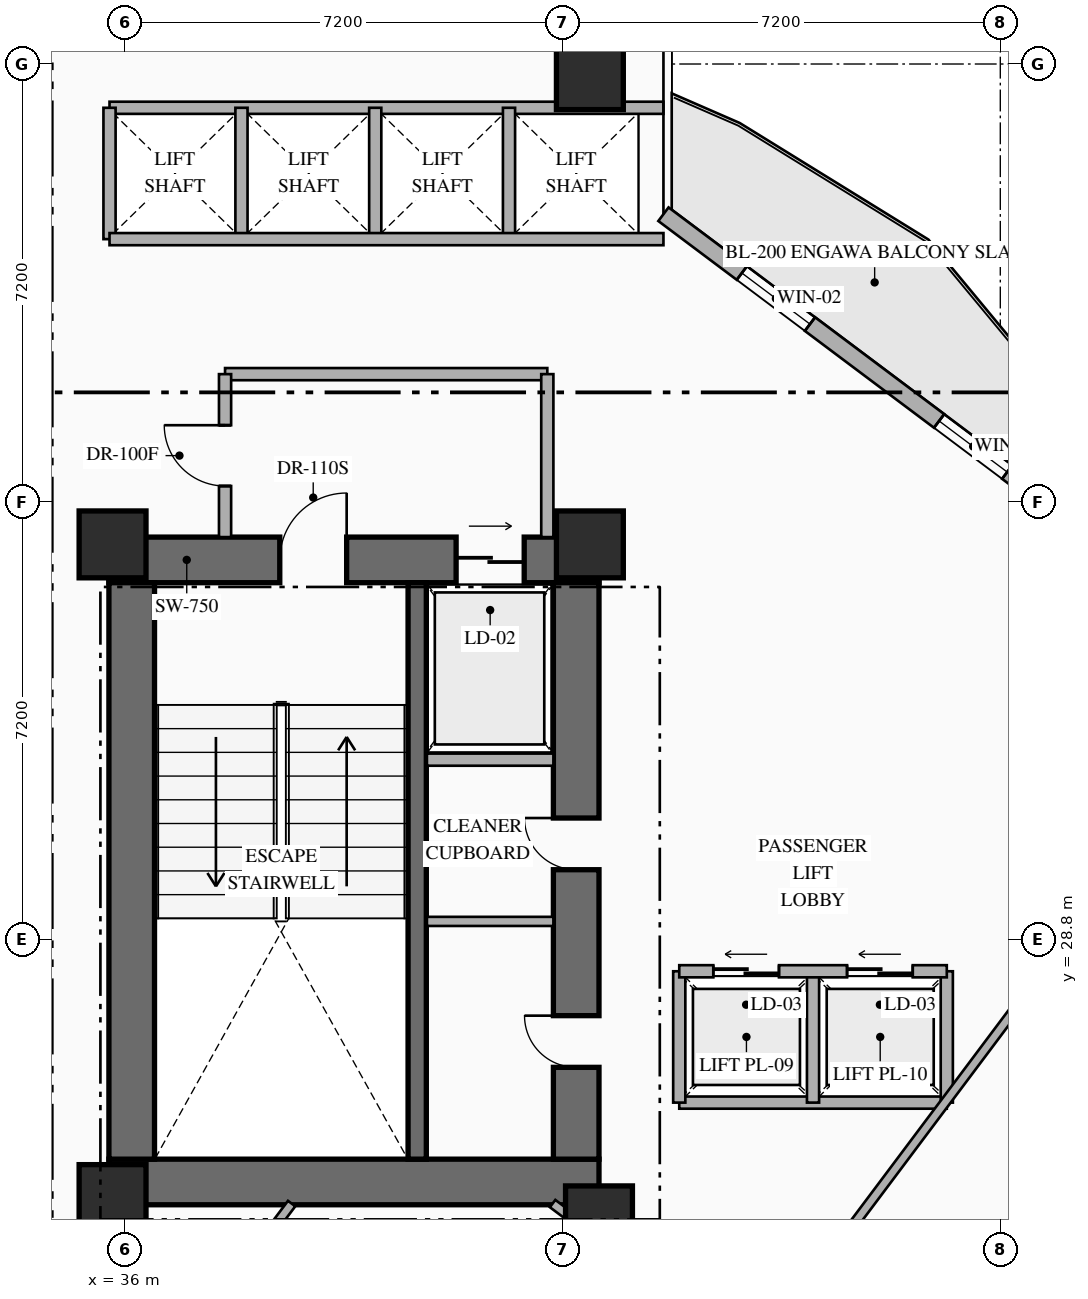
"""IFC4 building model, lengths in metres.
Left out: names, types, materials, properties, quantities, classifications, styles, units other than length and angle.
Written with IfcOpenShell. Run it as: python <this file> out.ifc"""

import sys

from ifc_helpers import new_model, si_unit, direction, frame, frame_2d, origin, origin_2d, place, context, subcontext, project, spatial, rectangle, extrude, element, fill, save


model = new_model("IFC4")
c1 = context("Model", 3, precision=1e-05, world=origin(), true_north=direction((0.0, 1.0)))
c2 = subcontext(c1, "Body", "Model", "MODEL_VIEW")
j1 = project(units=[si_unit("LENGTHUNIT", "METRE"), si_unit("PLANEANGLEUNIT", "RADIAN")], contexts=[c1])
p1 = place(None, origin())
s1 = spatial("IfcSite", under=j1, at=p1, CompositionType="ELEMENT")
p2 = place(p1, origin())
s2 = spatial("IfcBuilding", under=s1, at=p2, CompositionType="ELEMENT")
p3 = place(p2, frame((0.0, 0.0, 53.35)))
s3 = spatial("IfcBuildingStorey", under=s2, at=p3, CompositionType="ELEMENT", Elevation=53.35)
p4 = place(p3, frame((35.74, 24.815, 0.0), z_axis=(0.0, 0.0, 1.0), x_axis=(1.0, 0.0, 0.0)))
e1 = element("IfcWall", 1, at=p4, inside=s3, PredefinedType="SHEAR", context=c2, shape_type="SweptSolid", body=[
    extrude(rectangle(XDim=8.06, YDim=0.75, at=frame_2d((4.03, 0.0))), origin(), (0.0, 0.0, 1.0), 3.35),
])
p5 = place(p3, frame((35.74, 35.045, 0.0), z_axis=(0.0, 0.0, 1.0), x_axis=(1.0, 0.0, 0.0)))
e2 = element("IfcWall", 2, at=p5, inside=s3, PredefinedType="SHEAR", context=c2, shape_type="SweptSolid", body=[
    extrude(rectangle(XDim=8.06, YDim=0.75, at=frame_2d((4.03, 0.0))), origin(), (0.0, 0.0, 1.0), 3.35),
])
p6 = place(p5, frame((2.81, 0.0, 0.0)))
e3 = element("IfcOpeningElement", 3, at=p6, cuts=e2, PredefinedType="OPENING", context=c2, shape_type="SweptSolid", body=[
    extrude(rectangle(XDim=1.1, YDim=2.2, at=frame_2d((0.55, 1.1))), frame((0.0, 0.385, 0.0), z_axis=(0.0, -1.0, 0.0), x_axis=(1.0, 0.0, 0.0)), (0.0, 0.0, 1.0), 0.77),
])
p7 = place(p5, frame((5.71, 0.0, 0.0)))
e4 = element("IfcOpeningElement", 4, at=p7, cuts=e2, PredefinedType="OPENING", context=c2, shape_type="SweptSolid", body=[
    extrude(rectangle(XDim=1.12, YDim=2.15, at=frame_2d((0.56, 1.075))), frame((0.0, 0.385, 0.0), z_axis=(0.0, -1.0, 0.0), x_axis=(1.0, 0.0, 0.0)), (0.0, 0.0, 1.0), 0.77),
])
p8 = place(p3, frame((36.115, 25.19, 0.0), z_axis=(0.0, 0.0, 1.0), x_axis=(0.0, 1.0, 0.0)))
e5 = element("IfcWall", 5, at=p8, inside=s3, PredefinedType="SHEAR", context=c2, shape_type="SweptSolid", body=[
    extrude(rectangle(XDim=9.48, YDim=0.75, at=frame_2d((4.74, 0.0))), origin(), (0.0, 0.0, 1.0), 3.35),
])
p9 = place(p3, frame((43.425, 25.19, 0.0), z_axis=(0.0, 0.0, 1.0), x_axis=(0.0, 1.0, 0.0)))
e6 = element("IfcWall", 6, at=p9, inside=s3, PredefinedType="SHEAR", context=c2, shape_type="SweptSolid", body=[
    extrude(rectangle(XDim=9.48, YDim=0.75, at=frame_2d((4.74, 0.0))), origin(), (0.0, 0.0, 1.0), 3.35),
])
p10 = place(p9, frame((1.51, 0.0, 0.0)))
e7 = element("IfcOpeningElement", 7, at=p10, cuts=e6, PredefinedType="OPENING", context=c2, shape_type="SweptSolid", body=[
    extrude(rectangle(XDim=0.85, YDim=2.08, at=frame_2d((0.425, 1.04))), frame((0.0, 0.385, 0.0), z_axis=(0.0, -1.0, 0.0), x_axis=(1.0, 0.0, 0.0)), (0.0, 0.0, 1.0), 0.77),
])
p11 = place(p9, frame((4.76, 0.0, 0.0)))
e8 = element("IfcOpeningElement", 8, at=p11, cuts=e6, PredefinedType="OPENING", context=c2, shape_type="SweptSolid", body=[
    extrude(rectangle(XDim=0.85, YDim=2.08, at=frame_2d((0.425, 1.04))), frame((0.0, 0.385, 0.0), z_axis=(0.0, -1.0, 0.0), x_axis=(1.0, 0.0, 0.0)), (0.0, 0.0, 1.0), 0.77),
])
p12 = place(p3, frame((40.81, 25.19, 0.0), z_axis=(0.0, 0.0, 1.0), x_axis=(0.0, 1.0, 0.0)))
e9 = element("IfcWall", 9, at=p12, inside=s3, PredefinedType="SHEAR", context=c2, shape_type="SweptSolid", body=[
    extrude(rectangle(XDim=9.48, YDim=0.3, at=frame_2d((4.74, 0.0))), origin(), (0.0, 0.0, 1.0), 3.35),
])
for number, where, z_axis, x_axis in (
    (10, (35.8, 24.55, 0.0), (0.0, 0.0, 1.0), (1.0, 0.0, 0.0)),
    (11, (43.8, 24.2, 0.0), (0.0, 0.0, 1.0), (1.0, 0.0, 0.0)),
    (12, (35.8, 35.3, 0.0), (0.0, 0.0, 1.0), (1.0, 0.0, 0.0)),
    (13, (43.65, 35.3, 0.0), (0.0, 0.0, 1.0), (1.0, 0.0, 0.0)),
    (14, (43.65, 43.0, 0.0), (0.0, 0.0, 1.0), (1.0, 0.0, 0.0)),
):
    element("IfcColumn", number, at=place(p3, frame(where, z_axis=z_axis, x_axis=x_axis)), inside=s3, PredefinedType="COLUMN", context=c2, shape_type="SweptSolid", body=[
        extrude(rectangle(XDim=1.1, YDim=1.1, at=origin_2d()), origin(), (0.0, 0.0, 1.0), 3.35),
    ])
p13 = place(p3, frame((44.86, 40.73, 0.0), z_axis=(0.0, 0.0, 1.0), x_axis=(0.800006902154, -0.599990797017, 0.0)))
e15 = element("IfcWall", 15, at=p13, inside=s3, PredefinedType="STANDARD", context=c2, shape_type="SweptSolid", body=[
    extrude(rectangle(XDim=29.712, YDim=0.28, at=frame_2d((14.856, 0.0))), origin(), (0.0, 0.0, 1.0), 3.13),
])
p14 = place(p13, frame((14.249, 0.0, 0.0)))
e16 = element("IfcOpeningElement", 16, at=p14, cuts=e15, PredefinedType="OPENING", context=c2, shape_type="SweptSolid", body=[
    extrude(rectangle(XDim=1.1, YDim=2.2, at=frame_2d((0.55, 1.1))), frame((0.0, 0.15, 0.0), z_axis=(0.0, -1.0, 0.0), x_axis=(1.0, 0.0, 0.0)), (0.0, 0.0, 1.0), 0.3),
])
p15 = place(p13, frame((1.612, 0.0, 0.85)))
e17 = element("IfcOpeningElement", 17, at=p15, cuts=e15, PredefinedType="OPENING", context=c2, shape_type="SweptSolid", body=[
    extrude(rectangle(XDim=1.4, YDim=1.8, at=frame_2d((0.7, 0.9))), frame((0.0, 0.15, 0.0), z_axis=(0.0, -1.0, 0.0), x_axis=(1.0, 0.0, 0.0)), (0.0, 0.0, 1.0), 0.3),
])
p16 = place(p13, frame((5.667, 0.0, 0.85)))
e18 = element("IfcOpeningElement", 18, at=p16, cuts=e15, PredefinedType="OPENING", context=c2, shape_type="SweptSolid", body=[
    extrude(rectangle(XDim=1.4, YDim=1.8, at=frame_2d((0.7, 0.9))), frame((0.0, 0.15, 0.0), z_axis=(0.0, -1.0, 0.0), x_axis=(1.0, 0.0, 0.0)), (0.0, 0.0, 1.0), 0.3),
])
p17 = place(p13, frame((9.912, 0.0, 0.85)))
e19 = element("IfcOpeningElement", 19, at=p17, cuts=e15, PredefinedType="OPENING", context=c2, shape_type="SweptSolid", body=[
    extrude(rectangle(XDim=1.4, YDim=1.8, at=frame_2d((0.7, 0.9))), frame((0.0, 0.15, 0.0), z_axis=(0.0, -1.0, 0.0), x_axis=(1.0, 0.0, 0.0)), (0.0, 0.0, 1.0), 0.3),
])
p18 = place(p13, frame((19.743, 0.0, 0.85)))
e20 = element("IfcOpeningElement", 20, at=p18, cuts=e15, PredefinedType="OPENING", context=c2, shape_type="SweptSolid", body=[
    extrude(rectangle(XDim=1.4, YDim=1.8, at=frame_2d((0.7, 0.9))), frame((0.0, 0.15, 0.0), z_axis=(0.0, -1.0, 0.0), x_axis=(1.0, 0.0, 0.0)), (0.0, 0.0, 1.0), 0.3),
])
p19 = place(p13, frame((22.645, 0.0, 0.85)))
e21 = element("IfcOpeningElement", 21, at=p19, cuts=e15, PredefinedType="OPENING", context=c2, shape_type="SweptSolid", body=[
    extrude(rectangle(XDim=1.4, YDim=1.8, at=frame_2d((0.7, 0.9))), frame((0.0, 0.15, 0.0), z_axis=(0.0, -1.0, 0.0), x_axis=(1.0, 0.0, 0.0)), (0.0, 0.0, 1.0), 0.3),
])
p20 = place(p13, frame((26.7, 0.0, 0.85)))
e22 = element("IfcOpeningElement", 22, at=p20, cuts=e15, PredefinedType="OPENING", context=c2, shape_type="SweptSolid", body=[
    extrude(rectangle(XDim=1.4, YDim=1.8, at=frame_2d((0.7, 0.9))), frame((0.0, 0.15, 0.0), z_axis=(0.0, -1.0, 0.0), x_axis=(1.0, 0.0, 0.0)), (0.0, 0.0, 1.0), 0.3),
])
p21 = place(p3, frame((40.97, 31.76, 0.0), z_axis=(0.0, 0.0, 1.0), x_axis=(1.0, 0.0, 0.0)))
e23 = element("IfcWall", 23, at=p21, inside=s3, PredefinedType="STANDARD", context=c2, shape_type="SweptSolid", body=[
    extrude(rectangle(XDim=2.08, YDim=0.2, at=frame_2d((1.04, 0.0))), origin(), (0.0, 0.0, 1.0), 3.13),
])
p22 = place(p3, frame((40.97, 29.1, 0.0), z_axis=(0.0, 0.0, 1.0), x_axis=(1.0, 0.0, 0.0)))
e24 = element("IfcWall", 24, at=p22, inside=s3, PredefinedType="PARTITIONING", context=c2, shape_type="SweptSolid", body=[
    extrude(rectangle(XDim=2.08, YDim=0.15, at=frame_2d((1.04, 0.0))), origin(), (0.0, 0.0, 1.0), 3.13),
])
p23 = place(p3, frame((37.65, 38.1, 0.0), z_axis=(0.0, 0.0, 1.0), x_axis=(1.0, 0.0, 0.0)))
e25 = element("IfcWall", 25, at=p23, inside=s3, PredefinedType="STANDARD", context=c2, shape_type="SweptSolid", body=[
    extrude(rectangle(XDim=5.3, YDim=0.2, at=frame_2d((2.65, 0.0))), origin(), (0.0, 0.0, 1.0), 3.13),
])
p24 = place(p3, frame((42.95, 35.42, 0.0), z_axis=(0.0, 0.0, 1.0), x_axis=(0.0, 1.0, 0.0)))
e26 = element("IfcWall", 26, at=p24, inside=s3, PredefinedType="STANDARD", context=c2, shape_type="SweptSolid", body=[
    extrude(rectangle(XDim=2.68, YDim=0.2, at=frame_2d((1.34, 0.0))), origin(), (0.0, 0.0, 1.0), 3.13),
])
p25 = place(p3, frame((37.65, 35.42, 0.0), z_axis=(0.0, 0.0, 1.0), x_axis=(0.0, 1.0, 0.0)))
e27 = element("IfcWall", 27, at=p25, inside=s3, PredefinedType="STANDARD", context=c2, shape_type="SweptSolid", body=[
    extrude(rectangle(XDim=2.68, YDim=0.2, at=frame_2d((1.34, 0.0))), origin(), (0.0, 0.0, 1.0), 3.13),
])
p26 = place(p25, frame((0.84, 0.0, 0.0)))
e28 = element("IfcOpeningElement", 28, at=p26, cuts=e27, PredefinedType="OPENING", context=c2, shape_type="SweptSolid", body=[
    extrude(rectangle(XDim=1.0, YDim=2.2, at=frame_2d((0.5, 1.1))), frame((0.0, 0.11, 0.0), z_axis=(0.0, -1.0, 0.0), x_axis=(1.0, 0.0, 0.0)), (0.0, 0.0, 1.0), 0.22),
])
p27 = place(p3, frame((35.75, 42.48, 0.0), z_axis=(0.0, 0.0, 1.0), x_axis=(1.0, 0.0, 0.0)))
e29 = element("IfcWall", 29, at=p27, inside=s3, PredefinedType="STANDARD", context=c2, shape_type="SweptSolid", body=[
    extrude(rectangle(XDim=9.11, YDim=0.2, at=frame_2d((4.555, 0.0))), origin(), (0.0, 0.0, 1.0), 3.13),
])
for number, where, z_axis, x_axis in (
    (30, (35.75, 40.32, 0.0), (0.0, 0.0, 1.0), (0.0, 1.0, 0.0)),
    (31, (37.92, 40.32, 0.0), (0.0, 0.0, 1.0), (0.0, 1.0, 0.0)),
    (32, (40.12, 40.32, 0.0), (0.0, 0.0, 1.0), (0.0, 1.0, 0.0)),
    (33, (42.32, 40.32, 0.0), (0.0, 0.0, 1.0), (0.0, 1.0, 0.0)),
):
    element("IfcWall", number, at=place(p3, frame(where, z_axis=z_axis, x_axis=x_axis)), inside=s3, PredefinedType="STANDARD", context=c2, shape_type="SweptSolid", body=[
        extrude(rectangle(XDim=2.16, YDim=0.2, at=frame_2d((1.08, 0.0))), origin(), (0.0, 0.0, 1.0), 3.13),
    ])
p28 = place(p3, frame((35.75, 40.32, 0.0), z_axis=(0.0, 0.0, 1.0), x_axis=(1.0, 0.0, 0.0)))
e34 = element("IfcWall", 34, at=p28, inside=s3, PredefinedType="STANDARD", context=c2, shape_type="SweptSolid", body=[
    extrude(rectangle(XDim=9.11, YDim=0.2, at=frame_2d((4.555, 0.0))), origin(), (0.0, 0.0, 1.0), 3.13),
])
p29 = place(p3, frame((45.12, 26.12, 0.0), z_axis=(0.0, 0.0, 1.0), x_axis=(1.0, 0.0, 0.0)))
e35 = element("IfcWall", 35, at=p29, inside=s3, PredefinedType="STANDARD", context=c2, shape_type="SweptSolid", body=[
    extrude(rectangle(XDim=4.4, YDim=0.2, at=frame_2d((2.2, 0.0))), origin(), (0.0, 0.0, 1.0), 3.13),
])
for number, where, z_axis, x_axis in (
    (36, (45.12, 26.12, 0.0), (0.0, 0.0, 1.0), (0.0, 1.0, 0.0)),
    (37, (49.52, 26.12, 0.0), (0.0, 0.0, 1.0), (0.0, 1.0, 0.0)),
    (38, (47.32, 26.12, 0.0), (0.0, 0.0, 1.0), (0.0, 1.0, 0.0)),
):
    element("IfcWall", number, at=place(p3, frame(where, z_axis=z_axis, x_axis=x_axis)), inside=s3, PredefinedType="STANDARD", context=c2, shape_type="SweptSolid", body=[
        extrude(rectangle(XDim=2.16, YDim=0.2, at=frame_2d((1.08, 0.0))), origin(), (0.0, 0.0, 1.0), 3.13),
    ])
p30 = place(p3, frame((45.12, 28.28, 0.0), z_axis=(0.0, 0.0, 1.0), x_axis=(1.0, 0.0, 0.0)))
e39 = element("IfcWall", 39, at=p30, inside=s3, PredefinedType="STANDARD", context=c2, shape_type="SweptSolid", body=[
    extrude(rectangle(XDim=4.4, YDim=0.2, at=frame_2d((2.2, 0.0))), origin(), (0.0, 0.0, 1.0), 3.13),
])
p31 = place(p30, frame((0.56, 0.0, 0.0)))
e40 = element("IfcOpeningElement", 40, at=p31, cuts=e39, PredefinedType="OPENING", context=c2, shape_type="SweptSolid", body=[
    extrude(rectangle(XDim=1.08, YDim=2.15, at=frame_2d((0.54, 1.075))), frame((0.0, 0.11, 0.0), z_axis=(0.0, -1.0, 0.0), x_axis=(1.0, 0.0, 0.0)), (0.0, 0.0, 1.0), 0.22),
])
p32 = place(p30, frame((2.76, 0.0, 0.0)))
e41 = element("IfcOpeningElement", 41, at=p32, cuts=e39, PredefinedType="OPENING", context=c2, shape_type="SweptSolid", body=[
    extrude(rectangle(XDim=1.08, YDim=2.15, at=frame_2d((0.54, 1.075))), frame((0.0, 0.11, 0.0), z_axis=(0.0, -1.0, 0.0), x_axis=(1.0, 0.0, 0.0)), (0.0, 0.0, 1.0), 0.22),
])
p33 = place(p3, frame((43.037, 24.46, 0.0), z_axis=(0.0, 0.0, 1.0), x_axis=(0.799971872363, -0.600037501685, 0.0)))
e42 = element("IfcWall", 42, at=p33, inside=s3, PredefinedType="PARTITIONING", context=c2, shape_type="SweptSolid", body=[
    extrude(rectangle(XDim=4.167, YDim=0.15, at=frame_2d((2.083, 0.0))), origin(), (0.0, 0.0, 1.0), 2.425),
])
p34 = place(p33, frame((2.468, 0.0, 0.0)))
e43 = element("IfcOpeningElement", 43, at=p34, cuts=e42, PredefinedType="OPENING", context=c2, shape_type="SweptSolid", body=[
    extrude(rectangle(XDim=0.95, YDim=2.15, at=frame_2d((0.475, 1.075))), frame((0.0, 0.085, 0.0), z_axis=(0.0, -1.0, 0.0), x_axis=(1.0, 0.0, 0.0)), (0.0, 0.0, 1.0), 0.17),
])
p35 = place(p3, frame((33.384, 17.312, 0.0), z_axis=(0.0, 0.0, 1.0), x_axis=(0.600008743659, 0.799993442181, 0.0)))
e44 = element("IfcWall", 44, at=p35, inside=s3, PredefinedType="PARTITIONING", context=c2, shape_type="SweptSolid", body=[
    extrude(rectangle(XDim=8.935, YDim=0.15, at=frame_2d((4.468, 0.0))), origin(), (0.0, 0.0, 1.0), 3.13),
])
p36 = place(p3, frame((47.87, 23.96, 0.0), z_axis=(0.0, 0.0, 1.0), x_axis=(0.599996617946, 0.80000253653, 0.0)))
e45 = element("IfcWall", 45, at=p36, inside=s3, PredefinedType="PARTITIONING", context=c2, shape_type="SweptSolid", body=[
    extrude(rectangle(XDim=11.55, YDim=0.15, at=frame_2d((5.775, 0.0))), origin(), (0.0, 0.0, 1.0), 3.13),
])
p37 = place(p15, origin())
e46 = element("IfcWindow", 46, at=p37, inside=s3, PartitioningType="SINGLE_PANEL", PredefinedType="WINDOW", context=c2, shape_type="SweptSolid", body=[
    extrude(rectangle(XDim=1.4, YDim=1.8, at=frame_2d((0.7, 0.9))), frame((0.0, 0.03, 0.0), z_axis=(0.0, -1.0, 0.0), x_axis=(1.0, 0.0, 0.0)), (0.0, 0.0, 1.0), 0.06),
])
fill(e17, e46)
p38 = place(p16, origin())
e47 = element("IfcWindow", 47, at=p38, inside=s3, PartitioningType="SINGLE_PANEL", PredefinedType="WINDOW", context=c2, shape_type="SweptSolid", body=[
    extrude(rectangle(XDim=1.4, YDim=1.8, at=frame_2d((0.7, 0.9))), frame((0.0, 0.03, 0.0), z_axis=(0.0, -1.0, 0.0), x_axis=(1.0, 0.0, 0.0)), (0.0, 0.0, 1.0), 0.06),
])
fill(e18, e47)
p39 = place(p6, origin())
e48 = element("IfcDoor", 48, at=p39, inside=s3, OperationType="SINGLE_SWING_RIGHT", PredefinedType="DOOR", context=c2, shape_type="SweptSolid", body=[
    extrude(rectangle(XDim=1.1, YDim=2.2, at=frame_2d((0.55, 1.1))), frame((0.0, 0.025, 0.0), z_axis=(0.0, -1.0, 0.0), x_axis=(1.0, 0.0, 0.0)), (0.0, 0.0, 1.0), 0.05),
])
fill(e3, e48)
p40 = place(p7, origin())
e49 = element("IfcDoor", 49, at=p40, inside=s3, OperationType="SLIDING_TO_RIGHT", PredefinedType="USERDEFINED", context=c2, shape_type="SweptSolid", body=[
    extrude(rectangle(XDim=1.12, YDim=2.15, at=frame_2d((0.56, 1.075))), frame((0.0, 0.025, 0.0), z_axis=(0.0, -1.0, 0.0), x_axis=(1.0, 0.0, 0.0)), (0.0, 0.0, 1.0), 0.05),
])
fill(e4, e49)
p41 = place(p10, origin())
e50 = element("IfcDoor", 50, at=p41, inside=s3, OperationType="SINGLE_SWING_RIGHT", PredefinedType="DOOR", context=c2, shape_type="SweptSolid", body=[
    extrude(rectangle(XDim=0.85, YDim=2.08, at=frame_2d((0.425, 1.04))), frame((0.0, 0.025, 0.0), z_axis=(0.0, -1.0, 0.0), x_axis=(1.0, 0.0, 0.0)), (0.0, 0.0, 1.0), 0.05),
])
fill(e7, e50)
p42 = place(p11, origin())
e51 = element("IfcDoor", 51, at=p42, inside=s3, OperationType="SINGLE_SWING_RIGHT", PredefinedType="DOOR", context=c2, shape_type="SweptSolid", body=[
    extrude(rectangle(XDim=0.85, YDim=2.08, at=frame_2d((0.425, 1.04))), frame((0.0, 0.025, 0.0), z_axis=(0.0, -1.0, 0.0), x_axis=(1.0, 0.0, 0.0)), (0.0, 0.0, 1.0), 0.05),
])
fill(e8, e51)
p43 = place(p26, origin())
e52 = element("IfcDoor", 52, at=p43, inside=s3, OperationType="SINGLE_SWING_RIGHT", PredefinedType="DOOR", context=c2, shape_type="SweptSolid", body=[
    extrude(rectangle(XDim=1.0, YDim=2.2, at=frame_2d((0.5, 1.1))), frame((0.0, 0.025, 0.0), z_axis=(0.0, -1.0, 0.0), x_axis=(1.0, 0.0, 0.0)), (0.0, 0.0, 1.0), 0.05),
])
fill(e28, e52)
p44 = place(p31, origin())
e53 = element("IfcDoor", 53, at=p44, inside=s3, OperationType="SLIDING_TO_LEFT", PredefinedType="USERDEFINED", context=c2, shape_type="SweptSolid", body=[
    extrude(rectangle(XDim=1.08, YDim=2.15, at=frame_2d((0.54, 1.075))), frame((0.0, 0.025, 0.0), z_axis=(0.0, -1.0, 0.0), x_axis=(1.0, 0.0, 0.0)), (0.0, 0.0, 1.0), 0.05),
])
fill(e40, e53)
p45 = place(p32, origin())
e54 = element("IfcDoor", 54, at=p45, inside=s3, OperationType="SLIDING_TO_LEFT", PredefinedType="USERDEFINED", context=c2, shape_type="SweptSolid", body=[
    extrude(rectangle(XDim=1.08, YDim=2.15, at=frame_2d((0.54, 1.075))), frame((0.0, 0.025, 0.0), z_axis=(0.0, -1.0, 0.0), x_axis=(1.0, 0.0, 0.0)), (0.0, 0.0, 1.0), 0.05),
])
fill(e41, e54)
save(model, sys.argv[1])
